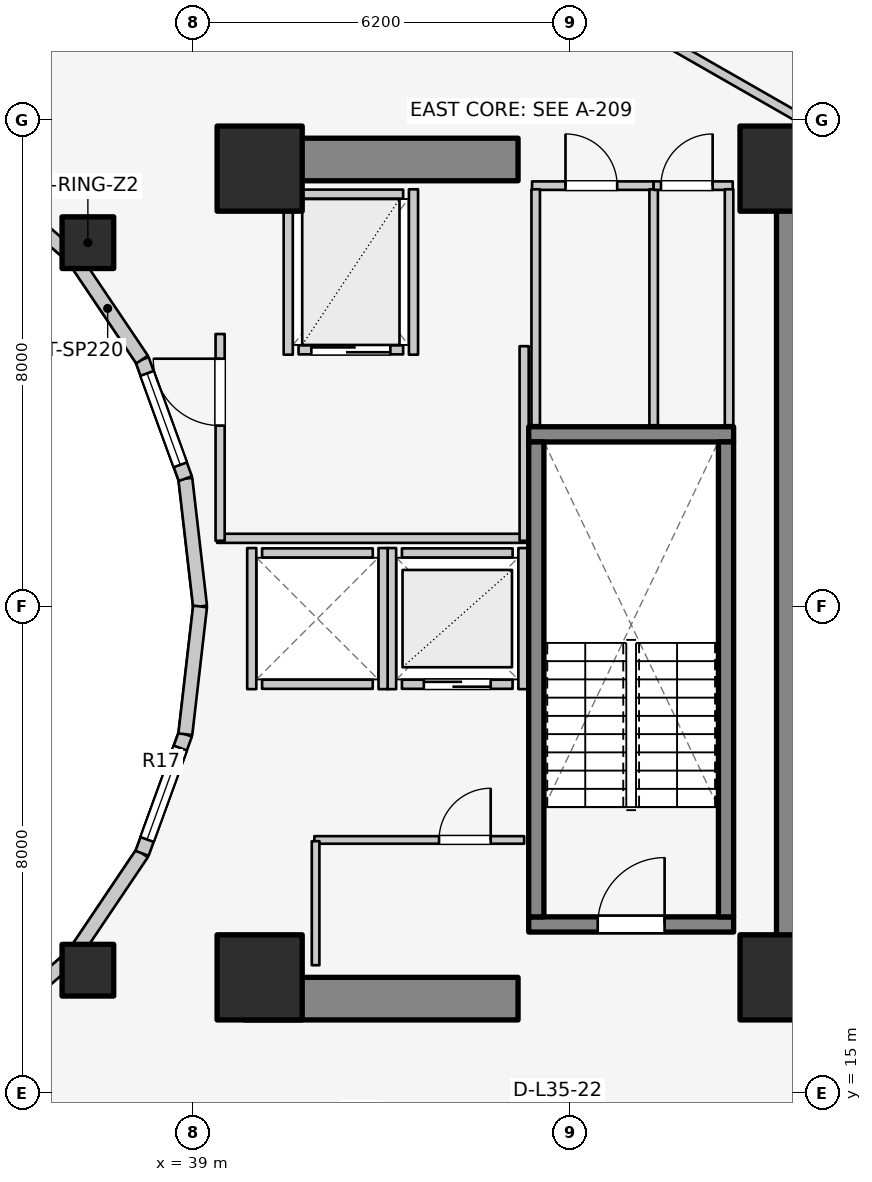
"""IFC4 building model, lengths in metres.
Left out: names, types, materials, properties, quantities, classifications, styles, units other than length and angle.
Written with IfcOpenShell. Run it as: python <this file> out.ifc"""

import sys

from ifc_helpers import new_model, si_unit, direction, frame, frame_2d, origin, origin_2d, place, context, subcontext, project, spatial, rectangle, extrude, element, fill, save


model = new_model("IFC4")
c1 = context("Model", 3, precision=1e-05, world=origin(), true_north=direction((0.0, 1.0)))
c2 = subcontext(c1, "Body", "Model", "MODEL_VIEW")
j1 = project(units=[si_unit("LENGTHUNIT", "METRE"), si_unit("PLANEANGLEUNIT", "RADIAN")], contexts=[c1])
p1 = place(None, origin())
s1 = spatial("IfcSite", under=j1, at=p1, CompositionType="ELEMENT")
p2 = place(p1, origin())
s2 = spatial("IfcBuilding", under=s1, at=p2, CompositionType="ELEMENT")
p3 = place(p2, frame((0.0, 0.0, 116.6)))
s3 = spatial("IfcBuildingStorey", under=s2, at=p3, CompositionType="ELEMENT", Elevation=116.6)
p4 = place(p3, frame((48.95, 17.05, 0.0), z_axis=(0.0, 0.0, 1.0), x_axis=(0.0, 1.0, 0.0)))
e1 = element("IfcWall", 1, at=p4, inside=s3, PredefinedType="SHEAR", context=c2, shape_type="SweptSolid", body=[
    extrude(rectangle(XDim=12.8, YDim=0.7, at=frame_2d((6.4, 0.0))), origin(), (0.0, 0.0, 1.0), 3.1),
])
for number, where, z_axis, x_axis in (
    (2, (39.85, 16.55, 0.0), (0.0, 0.0, 1.0), (1.0, 0.0, 0.0)),
    (3, (39.85, 30.35, 0.0), (0.0, 0.0, 1.0), (1.0, 0.0, 0.0)),
):
    element("IfcWall", number, at=place(p3, frame(where, z_axis=z_axis, x_axis=x_axis)), inside=s3, PredefinedType="SHEAR", context=c2, shape_type="SweptSolid", body=[
        extrude(rectangle(XDim=4.5, YDim=0.7, at=frame_2d((2.25, 0.0))), origin(), (0.0, 0.0, 1.0), 3.1),
    ])
p5 = place(p3, frame((44.525, 17.77, 0.0), z_axis=(0.0, 0.0, 1.0), x_axis=(1.0, 0.0, 0.0)))
e4 = element("IfcWall", 4, at=p5, inside=s3, PredefinedType="SOLIDWALL", context=c2, shape_type="SweptSolid", body=[
    extrude(rectangle(XDim=3.37, YDim=0.25, at=frame_2d((1.685, 0.0))), origin(), (0.0, 0.0, 1.0), 3.1),
])
p6 = place(p5, frame((1.135, 0.0, 0.0)))
e5 = element("IfcOpeningElement", 5, at=p6, cuts=e4, PredefinedType="OPENING", context=c2, shape_type="SweptSolid", body=[
    extrude(rectangle(XDim=1.1, YDim=2.1, at=frame_2d((0.55, 1.05))), frame((0.0, 0.135, 0.0), z_axis=(0.0, -1.0, 0.0), x_axis=(1.0, 0.0, 0.0)), (0.0, 0.0, 1.0), 0.27),
])
p7 = place(p3, frame((44.525, 25.83, 0.0), z_axis=(0.0, 0.0, 1.0), x_axis=(1.0, 0.0, 0.0)))
e6 = element("IfcWall", 6, at=p7, inside=s3, PredefinedType="SOLIDWALL", context=c2, shape_type="SweptSolid", body=[
    extrude(rectangle(XDim=3.37, YDim=0.25, at=frame_2d((1.685, 0.0))), origin(), (0.0, 0.0, 1.0), 3.1),
])
for number, where, z_axis, x_axis in (
    (7, (44.65, 17.895, 0.0), (0.0, 0.0, 1.0), (0.0, 1.0, 0.0)),
    (8, (47.77, 17.895, 0.0), (0.0, 0.0, 1.0), (0.0, 1.0, 0.0)),
):
    element("IfcWall", number, at=place(p3, frame(where, z_axis=z_axis, x_axis=x_axis)), inside=s3, PredefinedType="SOLIDWALL", context=c2, shape_type="SweptSolid", body=[
        extrude(rectangle(XDim=7.81, YDim=0.25, at=frame_2d((3.905, 0.0))), origin(), (0.0, 0.0, 1.0), 3.1),
    ])
for number, where, z_axis, x_axis in (
    (9, (40.1, 16.9, 0.0), (0.0, 0.0, 1.0), (1.0, 0.0, 0.0)),
    (10, (48.7, 16.9, 0.0), (0.0, 0.0, 1.0), (1.0, 0.0, 0.0)),
    (11, (48.7, 30.2, 0.0), (0.0, 0.0, 1.0), (1.0, 0.0, 0.0)),
    (12, (40.1, 30.2, 0.0), (0.0, 0.0, 1.0), (1.0, 0.0, 0.0)),
):
    element("IfcColumn", number, at=place(p3, frame(where, z_axis=z_axis, x_axis=x_axis)), inside=s3, PredefinedType="COLUMN", context=c2, shape_type="SweptSolid", body=[
        extrude(rectangle(XDim=1.4, YDim=1.4, at=origin_2d()), origin(), (0.0, 0.0, 1.0), 3.1),
    ])
for number, where, z_axis, x_axis in (
    (13, (37.275, 28.982, 0.0), (0.0, 0.0, 1.0), (1.0, 0.0, 0.0)),
    (14, (37.275, 17.018, 0.0), (0.0, 0.0, 1.0), (1.0, 0.0, 0.0)),
):
    element("IfcColumn", number, at=place(p3, frame(where, z_axis=z_axis, x_axis=x_axis)), inside=s3, PredefinedType="COLUMN", context=c2, shape_type="SweptSolid", body=[
        extrude(rectangle(XDim=0.85, YDim=0.85, at=origin_2d()), origin(), (0.0, 0.0, 1.0), 3.1),
    ])
p8 = place(p3, frame((39.12, 23.0, 0.0), z_axis=(0.0, 0.0, 1.0), x_axis=(-0.114711713601, 0.993398823617, 0.0)))
e15 = element("IfcWall", 15, at=p8, inside=s3, PredefinedType="STANDARD", context=c2, shape_type="SweptSolid", body=[
    extrude(rectangle(XDim=2.115, YDim=0.23, at=frame_2d((1.058, 0.0))), origin(), (0.0, 0.0, 1.0), 2.84),
])
p9 = place(p3, frame((38.877, 25.102, 0.0), z_axis=(0.0, 0.0, 1.0), x_axis=(-0.341423187295, 0.93990968033, 0.0)))
e16 = element("IfcWall", 16, at=p9, inside=s3, PredefinedType="STANDARD", context=c2, shape_type="SweptSolid", body=[
    extrude(rectangle(XDim=2.084, YDim=0.23, at=frame_2d((1.042, 0.0))), origin(), (0.0, 0.0, 1.0), 2.84),
])
p10 = place(p9, frame((0.242, 0.0, 0.85)))
e17 = element("IfcOpeningElement", 17, at=p10, cuts=e16, PredefinedType="OPENING", context=c2, shape_type="SweptSolid", body=[
    extrude(rectangle(XDim=1.6, YDim=1.65, at=frame_2d((0.8, 0.825))), frame((0.0, 0.125, 0.0), z_axis=(0.0, -1.0, 0.0), x_axis=(1.0, 0.0, 0.0)), (0.0, 0.0, 1.0), 0.25),
])
p11 = place(p3, frame((38.166, 27.06, 0.0), z_axis=(0.0, 0.0, 1.0), x_axis=(-0.558197800898, 0.829707909492, 0.0)))
e18 = element("IfcWall", 18, at=p11, inside=s3, PredefinedType="STANDARD", context=c2, shape_type="SweptSolid", body=[
    extrude(rectangle(XDim=2.027, YDim=0.23, at=frame_2d((1.013, 0.0))), origin(), (0.0, 0.0, 1.0), 2.16),
])
for number, where, z_axis, x_axis in (
    (19, (37.035, 28.742, 0.0), (0.0, 0.0, 1.0), (-0.753, 0.659, 0.0)),
    (20, (35.56, 15.968, 0.0), (0.0, 0.0, 1.0), (0.753, 0.659, 0.0)),
):
    element("IfcWall", number, at=place(p3, frame(where, z_axis=z_axis, x_axis=x_axis)), inside=s3, PredefinedType="STANDARD", context=c2, shape_type="SweptSolid", body=[
        extrude(rectangle(XDim=1.959, YDim=0.23, at=frame_2d((0.98, 0.0))), origin(), (0.0, 0.0, 1.0), 2.16),
    ])
p12 = place(p3, frame((37.035, 17.258, 0.0), z_axis=(0.0, 0.0, 1.0), x_axis=(0.558197800898, 0.829707909492, 0.0)))
e21 = element("IfcWall", 21, at=p12, inside=s3, PredefinedType="STANDARD", context=c2, shape_type="SweptSolid", body=[
    extrude(rectangle(XDim=2.027, YDim=0.23, at=frame_2d((1.013, 0.0))), origin(), (0.0, 0.0, 1.0), 2.16),
])
p13 = place(p3, frame((38.166, 18.94, 0.0), z_axis=(0.0, 0.0, 1.0), x_axis=(0.341423187295, 0.93990968033, 0.0)))
e22 = element("IfcWall", 22, at=p13, inside=s3, PredefinedType="STANDARD", context=c2, shape_type="SweptSolid", body=[
    extrude(rectangle(XDim=2.084, YDim=0.23, at=frame_2d((1.042, 0.0))), origin(), (0.0, 0.0, 1.0), 2.84),
])
p14 = place(p13, frame((0.242, 0.0, 0.85)))
e23 = element("IfcOpeningElement", 23, at=p14, cuts=e22, PredefinedType="OPENING", context=c2, shape_type="SweptSolid", body=[
    extrude(rectangle(XDim=1.6, YDim=1.65, at=frame_2d((0.8, 0.825))), frame((0.0, 0.125, 0.0), z_axis=(0.0, -1.0, 0.0), x_axis=(1.0, 0.0, 0.0)), (0.0, 0.0, 1.0), 0.25),
])
p15 = place(p3, frame((38.877, 20.898, 0.0), z_axis=(0.0, 0.0, 1.0), x_axis=(0.114711713601, 0.993398823617, 0.0)))
e24 = element("IfcWall", 24, at=p15, inside=s3, PredefinedType="STANDARD", context=c2, shape_type="SweptSolid", body=[
    extrude(rectangle(XDim=2.115, YDim=0.23, at=frame_2d((1.058, 0.0))), origin(), (0.0, 0.0, 1.0), 2.84),
])
p16 = place(p3, frame((42.44, 21.72, 0.0), z_axis=(0.0, 0.0, 1.0), x_axis=(1.0, 0.0, 0.0)))
e25 = element("IfcWall", 25, at=p16, inside=s3, PredefinedType="SOLIDWALL", context=c2, shape_type="SweptSolid", body=[
    extrude(rectangle(XDim=1.82, YDim=0.15, at=frame_2d((0.91, 0.0))), origin(), (0.0, 0.0, 1.0), 2.855),
])
p17 = place(p16, frame((0.36, 0.0, 0.0)))
e26 = element("IfcOpeningElement", 26, at=p17, cuts=e25, PredefinedType="OPENING", context=c2, shape_type="SweptSolid", body=[
    extrude(rectangle(XDim=1.1, YDim=2.1, at=frame_2d((0.55, 1.05))), frame((0.0, 0.085, 0.0), z_axis=(0.0, -1.0, 0.0), x_axis=(1.0, 0.0, 0.0)), (0.0, 0.0, 1.0), 0.17),
])
p18 = place(p3, frame((42.44, 23.88, 0.0), z_axis=(0.0, 0.0, 1.0), x_axis=(1.0, 0.0, 0.0)))
e27 = element("IfcWall", 27, at=p18, inside=s3, PredefinedType="SOLIDWALL", context=c2, shape_type="SweptSolid", body=[
    extrude(rectangle(XDim=1.82, YDim=0.15, at=frame_2d((0.91, 0.0))), origin(), (0.0, 0.0, 1.0), 2.855),
])
for number, where, z_axis, x_axis in (
    (28, (42.27, 21.64, 0.0), (0.0, 0.0, 1.0), (0.0, 1.0, 0.0)),
    (29, (44.43, 21.64, 0.0), (0.0, 0.0, 1.0), (0.0, 1.0, 0.0)),
):
    element("IfcWall", number, at=place(p3, frame(where, z_axis=z_axis, x_axis=x_axis)), inside=s3, PredefinedType="SOLIDWALL", context=c2, shape_type="SweptSolid", body=[
        extrude(rectangle(XDim=2.32, YDim=0.15, at=frame_2d((1.16, 0.0))), origin(), (0.0, 0.0, 1.0), 2.855),
    ])
for number, where, z_axis, x_axis in (
    (30, (40.14, 21.72, 0.0), (0.0, 0.0, 1.0), (1.0, 0.0, 0.0)),
    (31, (40.14, 23.88, 0.0), (0.0, 0.0, 1.0), (1.0, 0.0, 0.0)),
):
    element("IfcWall", number, at=place(p3, frame(where, z_axis=z_axis, x_axis=x_axis)), inside=s3, PredefinedType="SOLIDWALL", context=c2, shape_type="SweptSolid", body=[
        extrude(rectangle(XDim=1.82, YDim=0.15, at=frame_2d((0.91, 0.0))), origin(), (0.0, 0.0, 1.0), 2.12),
    ])
p19 = place(p3, frame((39.97, 21.64, 0.0), z_axis=(0.0, 0.0, 1.0), x_axis=(0.0, 1.0, 0.0)))
e32 = element("IfcWall", 32, at=p19, inside=s3, PredefinedType="SOLIDWALL", context=c2, shape_type="SweptSolid", body=[
    extrude(rectangle(XDim=2.32, YDim=0.15, at=frame_2d((1.16, 0.0))), origin(), (0.0, 0.0, 1.0), 2.12),
])
p20 = place(p3, frame((42.13, 21.64, 0.0), z_axis=(0.0, 0.0, 1.0), x_axis=(0.0, 1.0, 0.0)))
e33 = element("IfcWall", 33, at=p20, inside=s3, PredefinedType="SOLIDWALL", context=c2, shape_type="SweptSolid", body=[
    extrude(rectangle(XDim=2.32, YDim=0.15, at=frame_2d((1.16, 0.0))), origin(), (0.0, 0.0, 1.0), 2.855),
])
p21 = place(p3, frame((40.74, 27.22, 0.0), z_axis=(0.0, 0.0, 1.0), x_axis=(1.0, 0.0, 0.0)))
e34 = element("IfcWall", 34, at=p21, inside=s3, PredefinedType="SOLIDWALL", context=c2, shape_type="SweptSolid", body=[
    extrude(rectangle(XDim=1.72, YDim=0.15, at=frame_2d((0.86, 0.0))), origin(), (0.0, 0.0, 1.0), 2.855),
])
p22 = place(p21, frame((0.21, 0.0, 0.0)))
e35 = element("IfcOpeningElement", 35, at=p22, cuts=e34, PredefinedType="OPENING", context=c2, shape_type="SweptSolid", body=[
    extrude(rectangle(XDim=1.3, YDim=2.1, at=frame_2d((0.65, 1.05))), frame((0.0, 0.085, 0.0), z_axis=(0.0, -1.0, 0.0), x_axis=(1.0, 0.0, 0.0)), (0.0, 0.0, 1.0), 0.17),
])
p23 = place(p3, frame((40.74, 29.78, 0.0), z_axis=(0.0, 0.0, 1.0), x_axis=(1.0, 0.0, 0.0)))
e36 = element("IfcWall", 36, at=p23, inside=s3, PredefinedType="SOLIDWALL", context=c2, shape_type="SweptSolid", body=[
    extrude(rectangle(XDim=1.72, YDim=0.15, at=frame_2d((0.86, 0.0))), origin(), (0.0, 0.0, 1.0), 2.855),
])
for number, where, z_axis, x_axis in (
    (37, (40.57, 27.14, 0.0), (0.0, 0.0, 1.0), (0.0, 1.0, 0.0)),
    (38, (42.63, 27.14, 0.0), (0.0, 0.0, 1.0), (0.0, 1.0, 0.0)),
):
    element("IfcWall", number, at=place(p3, frame(where, z_axis=z_axis, x_axis=x_axis)), inside=s3, PredefinedType="SOLIDWALL", context=c2, shape_type="SweptSolid", body=[
        extrude(rectangle(XDim=2.72, YDim=0.15, at=frame_2d((1.36, 0.0))), origin(), (0.0, 0.0, 1.0), 2.855),
    ])
p24 = place(p3, frame((39.4, 24.12, 0.0), z_axis=(0.0, 0.0, 1.0), x_axis=(1.0, 0.0, 0.0)))
e39 = element("IfcWall", 39, at=p24, inside=s3, PredefinedType="PARTITIONING", context=c2, shape_type="SweptSolid", body=[
    extrude(rectangle(XDim=5.08, YDim=0.15, at=frame_2d((2.54, 0.0))), origin(), (0.0, 0.0, 1.0), 2.12),
])
p25 = place(p3, frame((44.45, 24.08, 0.0), z_axis=(0.0, 0.0, 1.0), x_axis=(0.0, 1.0, 0.0)))
e40 = element("IfcWall", 40, at=p25, inside=s3, PredefinedType="PARTITIONING", context=c2, shape_type="SweptSolid", body=[
    extrude(rectangle(XDim=3.2, YDim=0.15, at=frame_2d((1.6, 0.0))), origin(), (0.0, 0.0, 1.0), 2.855),
])
p26 = place(p3, frame((39.45, 24.08, 0.0), z_axis=(0.0, 0.0, 1.0), x_axis=(0.0, 1.0, 0.0)))
e41 = element("IfcWall", 41, at=p26, inside=s3, PredefinedType="PARTITIONING", context=c2, shape_type="SweptSolid", body=[
    extrude(rectangle(XDim=3.4, YDim=0.15, at=frame_2d((1.7, 0.0))), origin(), (0.0, 0.0, 1.0), 2.855),
])
p27 = place(p26, frame((1.894, 0.0, 0.0)))
e42 = element("IfcOpeningElement", 42, at=p27, cuts=e41, PredefinedType="OPENING", context=c2, shape_type="SweptSolid", body=[
    extrude(rectangle(XDim=1.1, YDim=2.1, at=frame_2d((0.55, 1.05))), frame((0.0, 0.085, 0.0), z_axis=(0.0, -1.0, 0.0), x_axis=(1.0, 0.0, 0.0)), (0.0, 0.0, 1.0), 0.17),
])
p28 = place(p3, frame((41.0, 19.16, 0.0), z_axis=(0.0, 0.0, 1.0), x_axis=(1.0, 0.0, 0.0)))
e43 = element("IfcWall", 43, at=p28, inside=s3, PredefinedType="PARTITIONING", context=c2, shape_type="SweptSolid", body=[
    extrude(rectangle(XDim=3.45, YDim=0.125, at=frame_2d((1.725, 0.0))), origin(), (0.0, 0.0, 1.0), 2.12),
])
p29 = place(p28, frame((2.05, 0.0, 0.0)))
e44 = element("IfcOpeningElement", 44, at=p29, cuts=e43, PredefinedType="OPENING", context=c2, shape_type="SweptSolid", body=[
    extrude(rectangle(XDim=0.85, YDim=2.05, at=frame_2d((0.425, 1.025))), frame((0.0, 0.073, 0.0), z_axis=(0.0, -1.0, 0.0), x_axis=(1.0, 0.0, 0.0)), (0.0, 0.0, 1.0), 0.145),
])
p30 = place(p3, frame((41.02, 17.1, 0.0), z_axis=(0.0, 0.0, 1.0), x_axis=(0.0, 1.0, 0.0)))
e45 = element("IfcWall", 45, at=p30, inside=s3, PredefinedType="PARTITIONING", context=c2, shape_type="SweptSolid", body=[
    extrude(rectangle(XDim=2.04, YDim=0.125, at=frame_2d((1.02, 0.0))), origin(), (0.0, 0.0, 1.0), 2.855),
])
p31 = place(p3, frame((44.58, 29.92, 0.0), z_axis=(0.0, 0.0, 1.0), x_axis=(1.0, 0.0, 0.0)))
e46 = element("IfcWall", 46, at=p31, inside=s3, PredefinedType="PLUMBINGWALL", context=c2, shape_type="SweptSolid", body=[
    extrude(rectangle(XDim=2.0, YDim=0.14, at=frame_2d((1.0, 0.0))), origin(), (0.0, 0.0, 1.0), 2.855),
])
p32 = place(p31, frame((0.55, 0.0, 0.0)))
e47 = element("IfcOpeningElement", 47, at=p32, cuts=e46, PredefinedType="OPENING", context=c2, shape_type="SweptSolid", body=[
    extrude(rectangle(XDim=0.85, YDim=2.05, at=frame_2d((0.425, 1.025))), frame((0.0, 0.08, 0.0), z_axis=(0.0, -1.0, 0.0), x_axis=(1.0, 0.0, 0.0)), (0.0, 0.0, 1.0), 0.16),
])
for number, where, z_axis, x_axis in (
    (48, (44.64, 25.98, 0.0), (0.0, 0.0, 1.0), (0.0, 1.0, 0.0)),
    (49, (46.58, 25.98, 0.0), (0.0, 0.0, 1.0), (0.0, 1.0, 0.0)),
):
    element("IfcWall", number, at=place(p3, frame(where, z_axis=z_axis, x_axis=x_axis)), inside=s3, PredefinedType="PLUMBINGWALL", context=c2, shape_type="SweptSolid", body=[
        extrude(rectangle(XDim=3.88, YDim=0.14, at=frame_2d((1.94, 0.0))), origin(), (0.0, 0.0, 1.0), 2.855),
    ])
p33 = place(p3, frame((46.58, 29.92, 0.0), z_axis=(0.0, 0.0, 1.0), x_axis=(1.0, 0.0, 0.0)))
e50 = element("IfcWall", 50, at=p33, inside=s3, PredefinedType="PLUMBINGWALL", context=c2, shape_type="SweptSolid", body=[
    extrude(rectangle(XDim=1.3, YDim=0.14, at=frame_2d((0.65, 0.0))), origin(), (0.0, 0.0, 1.0), 2.855),
])
p34 = place(p33, frame((0.12, 0.0, 0.0)))
e51 = element("IfcOpeningElement", 51, at=p34, cuts=e50, PredefinedType="OPENING", context=c2, shape_type="SweptSolid", body=[
    extrude(rectangle(XDim=0.85, YDim=2.05, at=frame_2d((0.425, 1.025))), frame((0.0, 0.08, 0.0), z_axis=(0.0, -1.0, 0.0), x_axis=(1.0, 0.0, 0.0)), (0.0, 0.0, 1.0), 0.16),
])
p35 = place(p3, frame((47.82, 25.98, 0.0), z_axis=(0.0, 0.0, 1.0), x_axis=(0.0, 1.0, 0.0)))
e52 = element("IfcWall", 52, at=p35, inside=s3, PredefinedType="PLUMBINGWALL", context=c2, shape_type="SweptSolid", body=[
    extrude(rectangle(XDim=3.88, YDim=0.14, at=frame_2d((1.94, 0.0))), origin(), (0.0, 0.0, 1.0), 2.855),
])
p36 = place(p3, frame((46.757, 32.305, 0.0), z_axis=(0.0, 0.0, 1.0), x_axis=(0.867991349648, -0.496579315857, 0.0)))
e53 = element("IfcWall", 53, at=p36, inside=s3, PredefinedType="PARTITIONING", context=c2, shape_type="SweptSolid", body=[
    extrude(rectangle(XDim=2.567, YDim=0.15, at=frame_2d((1.283, 0.0))), origin(), (0.0, 0.0, 1.0), 2.142),
])
p37 = place(p3, frame((35.55, 15.985, 0.0), z_axis=(0.0, 0.0, 1.0), x_axis=(0.524565340045, -0.851370192116, 0.0)))
e54 = element("IfcWall", 54, at=p37, inside=s3, PredefinedType="PARTITIONING", context=c2, shape_type="SweptSolid", body=[
    extrude(rectangle(XDim=3.027, YDim=0.125, at=frame_2d((1.514, 0.0))), origin(), (0.0, 0.0, 1.0), 2.272),
])
p38 = place(p10, origin())
e55 = element("IfcWindow", 55, at=p38, inside=s3, PartitioningType="SINGLE_PANEL", PredefinedType="WINDOW", context=c2, shape_type="SweptSolid", body=[
    extrude(rectangle(XDim=1.6, YDim=1.65, at=frame_2d((0.8, 0.825))), frame((0.0, 0.03, 0.0), z_axis=(0.0, -1.0, 0.0), x_axis=(1.0, 0.0, 0.0)), (0.0, 0.0, 1.0), 0.06),
])
fill(e17, e55)
p39 = place(p14, origin())
e56 = element("IfcWindow", 56, at=p39, inside=s3, PartitioningType="SINGLE_PANEL", PredefinedType="WINDOW", context=c2, shape_type="SweptSolid", body=[
    extrude(rectangle(XDim=1.6, YDim=1.65, at=frame_2d((0.8, 0.825))), frame((0.0, 0.03, 0.0), z_axis=(0.0, -1.0, 0.0), x_axis=(1.0, 0.0, 0.0)), (0.0, 0.0, 1.0), 0.06),
])
fill(e23, e56)
p40 = place(p6, origin())
e57 = element("IfcDoor", 57, at=p40, inside=s3, OperationType="SINGLE_SWING_RIGHT", PredefinedType="DOOR", context=c2, shape_type="SweptSolid", body=[
    extrude(rectangle(XDim=1.1, YDim=2.1, at=frame_2d((0.55, 1.05))), frame((0.0, 0.025, 0.0), z_axis=(0.0, -1.0, 0.0), x_axis=(1.0, 0.0, 0.0)), (0.0, 0.0, 1.0), 0.05),
])
fill(e5, e57)
p41 = place(p17, origin())
e58 = element("IfcDoor", 58, at=p41, inside=s3, OperationType="DOUBLE_DOOR_SLIDING", PredefinedType="DOOR", context=c2, shape_type="SweptSolid", body=[
    extrude(rectangle(XDim=1.1, YDim=2.1, at=frame_2d((0.55, 1.05))), frame((0.0, 0.025, 0.0), z_axis=(0.0, -1.0, 0.0), x_axis=(1.0, 0.0, 0.0)), (0.0, 0.0, 1.0), 0.05),
])
fill(e26, e58)
p42 = place(p22, origin())
e59 = element("IfcDoor", 59, at=p42, inside=s3, OperationType="DOUBLE_DOOR_SLIDING", PredefinedType="DOOR", context=c2, shape_type="SweptSolid", body=[
    extrude(rectangle(XDim=1.3, YDim=2.1, at=frame_2d((0.65, 1.05))), frame((0.0, 0.025, 0.0), z_axis=(0.0, -1.0, 0.0), x_axis=(1.0, 0.0, 0.0)), (0.0, 0.0, 1.0), 0.05),
])
fill(e35, e59)
p43 = place(p27, origin())
e60 = element("IfcDoor", 60, at=p43, inside=s3, OperationType="SINGLE_SWING_RIGHT", PredefinedType="DOOR", context=c2, shape_type="SweptSolid", body=[
    extrude(rectangle(XDim=1.1, YDim=2.1, at=frame_2d((0.55, 1.05))), frame((0.0, 0.025, 0.0), z_axis=(0.0, -1.0, 0.0), x_axis=(1.0, 0.0, 0.0)), (0.0, 0.0, 1.0), 0.05),
])
fill(e42, e60)
p44 = place(p29, origin())
e61 = element("IfcDoor", 61, at=p44, inside=s3, OperationType="SINGLE_SWING_RIGHT", PredefinedType="DOOR", context=c2, shape_type="SweptSolid", body=[
    extrude(rectangle(XDim=0.85, YDim=2.05, at=frame_2d((0.425, 1.025))), frame((0.0, 0.025, 0.0), z_axis=(0.0, -1.0, 0.0), x_axis=(1.0, 0.0, 0.0)), (0.0, 0.0, 1.0), 0.05),
])
fill(e44, e61)
p45 = place(p32, origin())
e62 = element("IfcDoor", 62, at=p45, inside=s3, OperationType="SINGLE_SWING_LEFT", PredefinedType="DOOR", context=c2, shape_type="SweptSolid", body=[
    extrude(rectangle(XDim=0.85, YDim=2.05, at=frame_2d((0.425, 1.025))), frame((0.0, 0.025, 0.0), z_axis=(0.0, -1.0, 0.0), x_axis=(1.0, 0.0, 0.0)), (0.0, 0.0, 1.0), 0.05),
])
fill(e47, e62)
p46 = place(p34, origin())
e63 = element("IfcDoor", 63, at=p46, inside=s3, OperationType="SINGLE_SWING_RIGHT", PredefinedType="DOOR", context=c2, shape_type="SweptSolid", body=[
    extrude(rectangle(XDim=0.85, YDim=2.05, at=frame_2d((0.425, 1.025))), frame((0.0, 0.025, 0.0), z_axis=(0.0, -1.0, 0.0), x_axis=(1.0, 0.0, 0.0)), (0.0, 0.0, 1.0), 0.05),
])
fill(e51, e63)
save(model, sys.argv[1])
